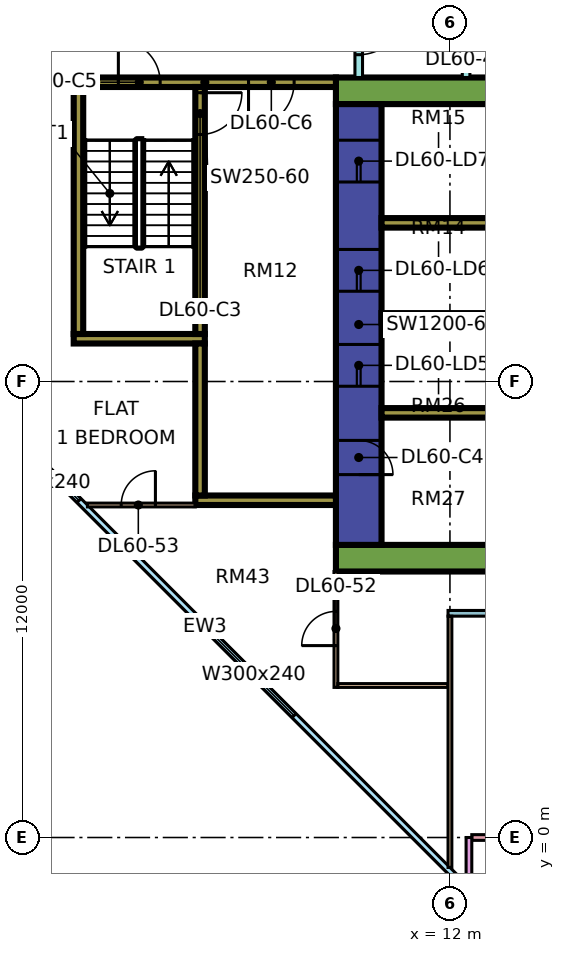
"""IFC4 building model, lengths in metres.
Left out: names, types, materials, properties, quantities, classifications, styles, units other than length and angle.
Written with IfcOpenShell. Run it as: python <this file> out.ifc"""

import sys

from ifc_helpers import new_model, si_unit, direction, frame, frame_2d, origin, place, context, subcontext, project, spatial, rectangle, extrude, element, fill, save


model = new_model("IFC4")
c1 = context("Model", 3, precision=1e-05, world=origin(), true_north=direction((0.0, 1.0)))
c2 = subcontext(c1, "Body", "Model", "MODEL_VIEW")
j1 = project(units=[si_unit("LENGTHUNIT", "METRE"), si_unit("PLANEANGLEUNIT", "RADIAN")], contexts=[c1])
p1 = place(None, origin())
s1 = spatial("IfcSite", under=j1, at=p1, CompositionType="ELEMENT")
p2 = place(p1, origin())
s2 = spatial("IfcBuilding", under=s1, at=p2, CompositionType="ELEMENT")
p3 = place(p2, frame((0.0, 0.0, 252.9)))
s3 = spatial("IfcBuildingStorey", under=s2, at=p3, CompositionType="ELEMENT", Elevation=252.9)
p4 = place(p3, frame((9.0, 7.35, 0.0), z_axis=(0.0, 0.0, 1.0), x_axis=(1.0, 0.0, 0.0)))
e1 = element("IfcWall", 1, at=p4, inside=s3, PredefinedType="SHEAR", context=c2, shape_type="SweptSolid", body=[
    extrude(rectangle(XDim=25.0, YDim=0.7, at=frame_2d((12.5, 0.0))), origin(), (0.0, 0.0, 1.0), 3.75),
])
p5 = place(p3, frame((9.0, 19.65, 0.0), z_axis=(0.0, 0.0, 1.0), x_axis=(1.0, 0.0, 0.0)))
e2 = element("IfcWall", 2, at=p5, inside=s3, PredefinedType="SHEAR", context=c2, shape_type="SweptSolid", body=[
    extrude(rectangle(XDim=25.0, YDim=0.7, at=frame_2d((12.5, 0.0))), origin(), (0.0, 0.0, 1.0), 3.75),
])
p6 = place(p5, frame((19.1, 0.0, 0.0)))
e3 = element("IfcOpeningElement", 3, at=p6, cuts=e2, PredefinedType="OPENING", context=c2, shape_type="SweptSolid", body=[
    extrude(rectangle(XDim=1.8, YDim=2.4, at=frame_2d((0.9, 1.2))), frame((0.0, 0.36, 0.0), z_axis=(0.0, -1.0, 0.0), x_axis=(1.0, 0.0, 0.0)), (0.0, 0.0, 1.0), 0.72),
])
p7 = place(p3, frame((9.6, 7.7, 0.0), z_axis=(0.0, 0.0, 1.0), x_axis=(0.0, 1.0, 0.0)))
e4 = element("IfcWall", 4, at=p7, inside=s3, PredefinedType="SHEAR", context=c2, shape_type="SweptSolid", body=[
    extrude(rectangle(XDim=11.6, YDim=1.2, at=frame_2d((5.8, 0.0))), origin(), (0.0, 0.0, 1.0), 3.75),
])
p8 = place(p7, frame((4.175, 0.0, 0.0)))
e5 = element("IfcOpeningElement", 5, at=p8, cuts=e4, PredefinedType="OPENING", context=c2, shape_type="SweptSolid", body=[
    extrude(rectangle(XDim=1.1, YDim=2.2, at=frame_2d((0.55, 1.1))), frame((0.0, 0.61, 0.0), z_axis=(0.0, -1.0, 0.0), x_axis=(1.0, 0.0, 0.0)), (0.0, 0.0, 1.0), 1.22),
])
p9 = place(p7, frame((6.675, 0.0, 0.0)))
e6 = element("IfcOpeningElement", 6, at=p9, cuts=e4, PredefinedType="OPENING", context=c2, shape_type="SweptSolid", body=[
    extrude(rectangle(XDim=1.1, YDim=2.2, at=frame_2d((0.55, 1.1))), frame((0.0, 0.61, 0.0), z_axis=(0.0, -1.0, 0.0), x_axis=(1.0, 0.0, 0.0)), (0.0, 0.0, 1.0), 1.22),
])
p10 = place(p7, frame((9.55, 0.0, 0.0)))
e7 = element("IfcOpeningElement", 7, at=p10, cuts=e4, PredefinedType="OPENING", context=c2, shape_type="SweptSolid", body=[
    extrude(rectangle(XDim=1.1, YDim=2.2, at=frame_2d((0.55, 1.1))), frame((0.0, 0.61, 0.0), z_axis=(0.0, -1.0, 0.0), x_axis=(1.0, 0.0, 0.0)), (0.0, 0.0, 1.0), 1.22),
])
p11 = place(p7, frame((1.85, 0.0, 0.0)))
e8 = element("IfcOpeningElement", 8, at=p11, cuts=e4, PredefinedType="OPENING", context=c2, shape_type="SweptSolid", body=[
    extrude(rectangle(XDim=0.9, YDim=2.1, at=frame_2d((0.45, 1.05))), frame((0.0, 0.61, 0.0), z_axis=(0.0, -1.0, 0.0), x_axis=(1.0, 0.0, 0.0)), (0.0, 0.0, 1.0), 1.22),
])
for number, where, z_axis, x_axis in (
    (9, (10.2, 11.175, 0.0), (0.0, 0.0, 1.0), (1.0, 0.0, 0.0)),
    (10, (10.2, 13.675, 0.0), (0.0, 0.0, 1.0), (1.0, 0.0, 0.0)),
    (11, (10.2, 16.175, 0.0), (0.0, 0.0, 1.0), (1.0, 0.0, 0.0)),
):
    element("IfcWall", number, at=place(p3, frame(where, z_axis=z_axis, x_axis=x_axis)), inside=s3, PredefinedType="SHEAR", context=c2, shape_type="SweptSolid", body=[
        extrude(rectangle(XDim=3.0, YDim=0.25, at=frame_2d((1.5, 0.0))), origin(), (0.0, 0.0, 1.0), 3.75),
    ])
p12 = place(p3, frame((2.1, 19.875, 0.0), z_axis=(0.0, 0.0, 1.0), x_axis=(1.0, 0.0, 0.0)))
e12 = element("IfcWall", 12, at=p12, inside=s3, PredefinedType="SHEAR", context=c2, shape_type="SweptSolid", body=[
    extrude(rectangle(XDim=6.9, YDim=0.25, at=frame_2d((3.45, 0.0))), origin(), (0.0, 0.0, 1.0), 3.75),
])
p13 = place(p12, frame((1.175, 0.0, 0.0)))
e13 = element("IfcOpeningElement", 13, at=p13, cuts=e12, PredefinedType="OPENING", context=c2, shape_type="SweptSolid", body=[
    extrude(rectangle(XDim=1.1, YDim=2.2, at=frame_2d((0.55, 1.1))), frame((0.0, 0.135, 0.0), z_axis=(0.0, -1.0, 0.0), x_axis=(1.0, 0.0, 0.0)), (0.0, 0.0, 1.0), 0.27),
])
p14 = place(p12, frame((4.6, 0.0, 0.0)))
e14 = element("IfcOpeningElement", 14, at=p14, cuts=e12, PredefinedType="OPENING", context=c2, shape_type="SweptSolid", body=[
    extrude(rectangle(XDim=1.2, YDim=2.2, at=frame_2d((0.6, 1.1))), frame((0.0, 0.135, 0.0), z_axis=(0.0, -1.0, 0.0), x_axis=(1.0, 0.0, 0.0)), (0.0, 0.0, 1.0), 0.27),
])
p15 = place(p3, frame((2.1, 13.125, 0.0), z_axis=(0.0, 0.0, 1.0), x_axis=(1.0, 0.0, 0.0)))
e15 = element("IfcWall", 15, at=p15, inside=s3, PredefinedType="SHEAR", context=c2, shape_type="SweptSolid", body=[
    extrude(rectangle(XDim=3.45, YDim=0.25, at=frame_2d((1.725, 0.0))), origin(), (0.0, 0.0, 1.0), 3.75),
])
p16 = place(p3, frame((2.225, 13.25, 0.0), z_axis=(0.0, 0.0, 1.0), x_axis=(0.0, 1.0, 0.0)))
e16 = element("IfcWall", 16, at=p16, inside=s3, PredefinedType="SHEAR", context=c2, shape_type="SweptSolid", body=[
    extrude(rectangle(XDim=6.5, YDim=0.25, at=frame_2d((3.25, 0.0))), origin(), (0.0, 0.0, 1.0), 3.75),
])
p17 = place(p3, frame((5.425, 13.25, 0.0), z_axis=(0.0, 0.0, 1.0), x_axis=(0.0, 1.0, 0.0)))
e17 = element("IfcWall", 17, at=p17, inside=s3, PredefinedType="SHEAR", context=c2, shape_type="SweptSolid", body=[
    extrude(rectangle(XDim=6.5, YDim=0.25, at=frame_2d((3.25, 0.0))), origin(), (0.0, 0.0, 1.0), 3.75),
])
p18 = place(p17, frame((5.25, 0.0, 0.0)))
e18 = element("IfcOpeningElement", 18, at=p18, cuts=e17, PredefinedType="OPENING", context=c2, shape_type="SweptSolid", body=[
    extrude(rectangle(XDim=1.1, YDim=2.2, at=frame_2d((0.55, 1.1))), frame((0.0, 0.135, 0.0), z_axis=(0.0, -1.0, 0.0), x_axis=(1.0, 0.0, 0.0)), (0.0, 0.0, 1.0), 0.27),
])
p19 = place(p3, frame((5.3, 8.875, 0.0), z_axis=(0.0, 0.0, 1.0), x_axis=(1.0, 0.0, 0.0)))
e19 = element("IfcWall", 19, at=p19, inside=s3, PredefinedType="SHEAR", context=c2, shape_type="SweptSolid", body=[
    extrude(rectangle(XDim=3.7, YDim=0.25, at=frame_2d((1.85, 0.0))), origin(), (0.0, 0.0, 1.0), 3.75),
])
p20 = place(p3, frame((5.425, 9.0, 0.0), z_axis=(0.0, 0.0, 1.0), x_axis=(0.0, 1.0, 0.0)))
e20 = element("IfcWall", 20, at=p20, inside=s3, PredefinedType="SHEAR", context=c2, shape_type="SweptSolid", body=[
    extrude(rectangle(XDim=4.0, YDim=0.25, at=frame_2d((2.0, 0.0))), origin(), (0.0, 0.0, 1.0), 3.75),
])
p21 = place(p3, frame((-1.447, 12.553, 0.0), z_axis=(0.0, 0.0, 1.0), x_axis=(0.707106781187, -0.707106781187, 0.0)))
e21 = element("IfcWall", 21, at=p21, inside=s3, PredefinedType="SOLIDWALL", context=c2, shape_type="SweptSolid", body=[
    extrude(rectangle(XDim=19.799, YDim=0.15, at=frame_2d((9.899, 0.0))), origin(), (0.0, 0.0, 1.0), 3.3),
])
p22 = place(p21, frame((2.212, 0.0, 0.45)))
e22 = element("IfcOpeningElement", 22, at=p22, cuts=e21, PredefinedType="OPENING", context=c2, shape_type="SweptSolid", body=[
    extrude(rectangle(XDim=3.0, YDim=2.4, at=frame_2d((1.5, 1.2))), frame((0.0, 0.085, 0.0), z_axis=(0.0, -1.0, 0.0), x_axis=(1.0, 0.0, 0.0)), (0.0, 0.0, 1.0), 0.17),
])
p23 = place(p21, frame((10.216, 0.0, 0.45)))
e23 = element("IfcOpeningElement", 23, at=p23, cuts=e21, PredefinedType="OPENING", context=c2, shape_type="SweptSolid", body=[
    extrude(rectangle(XDim=3.0, YDim=2.4, at=frame_2d((1.5, 1.2))), frame((0.0, 0.085, 0.0), z_axis=(0.0, -1.0, 0.0), x_axis=(1.0, 0.0, 0.0)), (0.0, 0.0, 1.0), 0.17),
])
p24 = place(p3, frame((12.575, 0.0, 0.0), z_axis=(0.0, 0.0, 1.0), x_axis=(1.0, 0.0, 0.0)))
e24 = element("IfcWall", 24, at=p24, inside=s3, PredefinedType="SOLIDWALL", context=c2, shape_type="SweptSolid", body=[
    extrude(rectangle(XDim=11.35, YDim=0.15, at=frame_2d((5.675, 0.0))), origin(), (0.0, 0.0, 1.0), 3.3),
])
p25 = place(p24, frame((3.312, 0.0, 0.0)))
e25 = element("IfcOpeningElement", 25, at=p25, cuts=e24, PredefinedType="OPENING", context=c2, shape_type="SweptSolid", body=[
    extrude(rectangle(XDim=1.8, YDim=2.4, at=frame_2d((0.9, 1.2))), frame((0.0, 0.085, 0.0), z_axis=(0.0, -1.0, 0.0), x_axis=(1.0, 0.0, 0.0)), (0.0, 0.0, 1.0), 0.17),
])
p26 = place(p24, frame((9.062, 0.0, 0.45)))
e26 = element("IfcOpeningElement", 26, at=p26, cuts=e24, PredefinedType="OPENING", context=c2, shape_type="SweptSolid", body=[
    extrude(rectangle(XDim=1.2, YDim=2.4, at=frame_2d((0.6, 1.2))), frame((0.0, 0.085, 0.0), z_axis=(0.0, -1.0, 0.0), x_axis=(1.0, 0.0, 0.0)), (0.0, 0.0, 1.0), 0.17),
])
p27 = place(p3, frame((12.5, -1.5, 0.0), z_axis=(0.0, 0.0, 1.0), x_axis=(0.0, 1.0, 0.0)))
e27 = element("IfcWall", 27, at=p27, inside=s3, PredefinedType="SOLIDWALL", context=c2, shape_type="SweptSolid", body=[
    extrude(rectangle(XDim=1.5, YDim=0.15, at=frame_2d((0.75, 0.0))), origin(), (0.0, 0.0, 1.0), 3.3),
])
p28 = place(p3, frame((0.074, 20.0, 0.0), z_axis=(0.0, 0.0, 1.0), x_axis=(1.0, 0.0, 0.0)))
e28 = element("IfcWall", 28, at=p28, inside=s3, PredefinedType="PARTITIONING", context=c2, shape_type="SweptSolid", body=[
    extrude(rectangle(XDim=2.026, YDim=0.2, at=frame_2d((1.013, 0.0))), origin(), (0.0, 0.0, 1.0), 3.3),
])
p29 = place(p3, frame((2.461, 8.75, 0.0), z_axis=(0.0, 0.0, 1.0), x_axis=(1.0, 0.0, 0.0)))
e29 = element("IfcWall", 29, at=p29, inside=s3, PredefinedType="PARTITIONING", context=c2, shape_type="SweptSolid", body=[
    extrude(rectangle(XDim=2.839, YDim=0.1, at=frame_2d((1.419, 0.0))), origin(), (0.0, 0.0, 1.0), 3.3),
])
p30 = place(p29, frame((0.889, 0.0, 0.0)))
e30 = element("IfcOpeningElement", 30, at=p30, cuts=e29, PredefinedType="OPENING", context=c2, shape_type="SweptSolid", body=[
    extrude(rectangle(XDim=0.9, YDim=2.1, at=frame_2d((0.45, 1.05))), frame((0.0, 0.06, 0.0), z_axis=(0.0, -1.0, 0.0), x_axis=(1.0, 0.0, 0.0)), (0.0, 0.0, 1.0), 0.12),
])
p31 = place(p3, frame((9.0, 3.95, 0.0), z_axis=(0.0, 0.0, 1.0), x_axis=(0.0, 1.0, 0.0)))
e31 = element("IfcWall", 31, at=p31, inside=s3, PredefinedType="PARTITIONING", context=c2, shape_type="SweptSolid", body=[
    extrude(rectangle(XDim=3.05, YDim=0.1, at=frame_2d((1.525, 0.0))), origin(), (0.0, 0.0, 1.0), 3.3),
])
p32 = place(p31, frame((1.1, 0.0, 0.0)))
e32 = element("IfcOpeningElement", 32, at=p32, cuts=e31, PredefinedType="OPENING", context=c2, shape_type="SweptSolid", body=[
    extrude(rectangle(XDim=0.9, YDim=2.1, at=frame_2d((0.45, 1.05))), frame((0.0, 0.06, 0.0), z_axis=(0.0, -1.0, 0.0), x_axis=(1.0, 0.0, 0.0)), (0.0, 0.0, 1.0), 0.12),
])
p33 = place(p3, frame((9.05, 4.0, 0.0), z_axis=(0.0, 0.0, 1.0), x_axis=(1.0, 0.0, 0.0)))
e33 = element("IfcWall", 33, at=p33, inside=s3, PredefinedType="PARTITIONING", context=c2, shape_type="SweptSolid", body=[
    extrude(rectangle(XDim=2.9, YDim=0.1, at=frame_2d((1.45, 0.0))), origin(), (0.0, 0.0, 1.0), 3.3),
])
p34 = place(p3, frame((9.6, 20.0, 0.0), z_axis=(0.0, 0.0, 1.0), x_axis=(0.0, 1.0, 0.0)))
e34 = element("IfcWall", 34, at=p34, inside=s3, PredefinedType="PARTITIONING", context=c2, shape_type="SweptSolid", body=[
    extrude(rectangle(XDim=44.35, YDim=0.2, at=frame_2d((22.175, 0.0))), origin(), (0.0, 0.0, 1.0), 3.3),
])
p35 = place(p34, frame((28.8, 0.0, 0.0)))
e35 = element("IfcOpeningElement", 35, at=p35, cuts=e34, PredefinedType="OPENING", context=c2, shape_type="SweptSolid", body=[
    extrude(rectangle(XDim=1.0, YDim=2.1, at=frame_2d((0.5, 1.05))), frame((0.0, 0.11, 0.0), z_axis=(0.0, -1.0, 0.0), x_axis=(1.0, 0.0, 0.0)), (0.0, 0.0, 1.0), 0.22),
])
p36 = place(p34, frame((0.6, 0.0, 0.0)))
e36 = element("IfcOpeningElement", 36, at=p36, cuts=e34, PredefinedType="OPENING", context=c2, shape_type="SweptSolid", body=[
    extrude(rectangle(XDim=1.2, YDim=2.1, at=frame_2d((0.6, 1.05))), frame((0.0, 0.11, 0.0), z_axis=(0.0, -1.0, 0.0), x_axis=(1.0, 0.0, 0.0)), (0.0, 0.0, 1.0), 0.22),
])
p37 = place(p34, frame((3.9, 0.0, 0.0)))
e37 = element("IfcOpeningElement", 37, at=p37, cuts=e34, PredefinedType="OPENING", context=c2, shape_type="SweptSolid", body=[
    extrude(rectangle(XDim=1.0, YDim=2.1, at=frame_2d((0.5, 1.05))), frame((0.0, 0.11, 0.0), z_axis=(0.0, -1.0, 0.0), x_axis=(1.0, 0.0, 0.0)), (0.0, 0.0, 1.0), 0.22),
])
p38 = place(p3, frame((11.95, 5.9, 0.0), z_axis=(0.0, 0.0, 1.0), x_axis=(1.0, 0.0, 0.0)))
e38 = element("IfcWall", 38, at=p38, inside=s3, PredefinedType="PARTITIONING", context=c2, shape_type="SweptSolid", body=[
    extrude(rectangle(XDim=21.1, YDim=0.15, at=frame_2d((10.55, 0.0))), origin(), (0.0, 0.0, 1.0), 3.3),
])
p39 = place(p38, frame((10.1, 0.0, 0.0)))
e39 = element("IfcOpeningElement", 39, at=p39, cuts=e38, PredefinedType="OPENING", context=c2, shape_type="SweptSolid", body=[
    extrude(rectangle(XDim=0.9, YDim=2.1, at=frame_2d((0.45, 1.05))), frame((0.0, 0.085, 0.0), z_axis=(0.0, -1.0, 0.0), x_axis=(1.0, 0.0, 0.0)), (0.0, 0.0, 1.0), 0.17),
])
p40 = place(p38, frame((16.1, 0.0, 0.0)))
e40 = element("IfcOpeningElement", 40, at=p40, cuts=e38, PredefinedType="OPENING", context=c2, shape_type="SweptSolid", body=[
    extrude(rectangle(XDim=0.9, YDim=2.1, at=frame_2d((0.45, 1.05))), frame((0.0, 0.085, 0.0), z_axis=(0.0, -1.0, 0.0), x_axis=(1.0, 0.0, 0.0)), (0.0, 0.0, 1.0), 0.17),
])
p41 = place(p38, frame((4.1, 0.0, 0.0)))
e41 = element("IfcOpeningElement", 41, at=p41, cuts=e38, PredefinedType="OPENING", context=c2, shape_type="SweptSolid", body=[
    extrude(rectangle(XDim=0.9, YDim=2.1, at=frame_2d((0.45, 1.05))), frame((0.0, 0.085, 0.0), z_axis=(0.0, -1.0, 0.0), x_axis=(1.0, 0.0, 0.0)), (0.0, 0.0, 1.0), 0.17),
])
p42 = place(p3, frame((12.0, -0.788, 0.0), z_axis=(0.0, 0.0, 1.0), x_axis=(0.0, 1.0, 0.0)))
e42 = element("IfcWall", 42, at=p42, inside=s3, PredefinedType="PARTITIONING", context=c2, shape_type="SweptSolid", body=[
    extrude(rectangle(XDim=6.613, YDim=0.1, at=frame_2d((3.306, 0.0))), origin(), (0.0, 0.0, 1.0), 3.3),
])
p43 = place(p3, frame((12.425, 20.0, 0.0), z_axis=(0.0, 0.0, 1.0), x_axis=(0.0, 1.0, 0.0)))
e43 = element("IfcWall", 43, at=p43, inside=s3, PredefinedType="PARTITIONING", context=c2, shape_type="SweptSolid", body=[
    extrude(rectangle(XDim=42.926, YDim=0.2, at=frame_2d((21.463, 0.0))), origin(), (0.0, 0.0, 1.0), 3.3),
])
p44 = place(p43, frame((7.0, 0.0, 0.0)))
e44 = element("IfcOpeningElement", 44, at=p44, cuts=e43, PredefinedType="OPENING", context=c2, shape_type="SweptSolid", body=[
    extrude(rectangle(XDim=1.0, YDim=2.1, at=frame_2d((0.5, 1.05))), frame((0.0, 0.11, 0.0), z_axis=(0.0, -1.0, 0.0), x_axis=(1.0, 0.0, 0.0)), (0.0, 0.0, 1.0), 0.22),
])
p45 = place(p43, frame((12.95, 0.0, 0.0)))
e45 = element("IfcOpeningElement", 45, at=p45, cuts=e43, PredefinedType="OPENING", context=c2, shape_type="SweptSolid", body=[
    extrude(rectangle(XDim=1.0, YDim=2.1, at=frame_2d((0.5, 1.05))), frame((0.0, 0.11, 0.0), z_axis=(0.0, -1.0, 0.0), x_axis=(1.0, 0.0, 0.0)), (0.0, 0.0, 1.0), 0.22),
])
p46 = place(p43, frame((16.75, 0.0, 0.0)))
e46 = element("IfcOpeningElement", 46, at=p46, cuts=e43, PredefinedType="OPENING", context=c2, shape_type="SweptSolid", body=[
    extrude(rectangle(XDim=1.0, YDim=2.1, at=frame_2d((0.5, 1.05))), frame((0.0, 0.11, 0.0), z_axis=(0.0, -1.0, 0.0), x_axis=(1.0, 0.0, 0.0)), (0.0, 0.0, 1.0), 0.22),
])
p47 = place(p43, frame((34.9, 0.0, 0.0)))
e47 = element("IfcOpeningElement", 47, at=p47, cuts=e43, PredefinedType="OPENING", context=c2, shape_type="SweptSolid", body=[
    extrude(rectangle(XDim=1.0, YDim=2.1, at=frame_2d((0.5, 1.05))), frame((0.0, 0.11, 0.0), z_axis=(0.0, -1.0, 0.0), x_axis=(1.0, 0.0, 0.0)), (0.0, 0.0, 1.0), 0.22),
])
p48 = place(p43, frame((1.15, 0.0, 0.0)))
e48 = element("IfcOpeningElement", 48, at=p48, cuts=e43, PredefinedType="OPENING", context=c2, shape_type="SweptSolid", body=[
    extrude(rectangle(XDim=1.8, YDim=2.1, at=frame_2d((0.9, 1.05))), frame((0.0, 0.11, 0.0), z_axis=(0.0, -1.0, 0.0), x_axis=(1.0, 0.0, 0.0)), (0.0, 0.0, 1.0), 0.22),
])
p49 = place(p43, frame((28.6, 0.0, 0.0)))
e49 = element("IfcOpeningElement", 49, at=p49, cuts=e43, PredefinedType="OPENING", context=c2, shape_type="SweptSolid", body=[
    extrude(rectangle(XDim=1.8, YDim=2.1, at=frame_2d((0.9, 1.05))), frame((0.0, 0.11, 0.0), z_axis=(0.0, -1.0, 0.0), x_axis=(1.0, 0.0, 0.0)), (0.0, 0.0, 1.0), 0.22),
])
p50 = place(p22, origin())
e50 = element("IfcWindow", 50, at=p50, inside=s3, PartitioningType="SINGLE_PANEL", PredefinedType="WINDOW", context=c2, shape_type="SweptSolid", body=[
    extrude(rectangle(XDim=3.0, YDim=2.4, at=frame_2d((1.5, 1.2))), frame((0.0, 0.03, 0.0), z_axis=(0.0, -1.0, 0.0), x_axis=(1.0, 0.0, 0.0)), (0.0, 0.0, 1.0), 0.06),
])
fill(e22, e50)
p51 = place(p23, origin())
e51 = element("IfcWindow", 51, at=p51, inside=s3, PartitioningType="SINGLE_PANEL", PredefinedType="WINDOW", context=c2, shape_type="SweptSolid", body=[
    extrude(rectangle(XDim=3.0, YDim=2.4, at=frame_2d((1.5, 1.2))), frame((0.0, 0.03, 0.0), z_axis=(0.0, -1.0, 0.0), x_axis=(1.0, 0.0, 0.0)), (0.0, 0.0, 1.0), 0.06),
])
fill(e23, e51)
p52 = place(p8, origin())
e52 = element("IfcDoor", 52, at=p52, inside=s3, OperationType="DOUBLE_DOOR_SLIDING", PredefinedType="DOOR", context=c2, shape_type="SweptSolid", body=[
    extrude(rectangle(XDim=1.1, YDim=2.2, at=frame_2d((0.55, 1.1))), frame((0.0, 0.025, 0.0), z_axis=(0.0, -1.0, 0.0), x_axis=(1.0, 0.0, 0.0)), (0.0, 0.0, 1.0), 0.05),
])
fill(e5, e52)
p53 = place(p9, origin())
e53 = element("IfcDoor", 53, at=p53, inside=s3, OperationType="DOUBLE_DOOR_SLIDING", PredefinedType="DOOR", context=c2, shape_type="SweptSolid", body=[
    extrude(rectangle(XDim=1.1, YDim=2.2, at=frame_2d((0.55, 1.1))), frame((0.0, 0.025, 0.0), z_axis=(0.0, -1.0, 0.0), x_axis=(1.0, 0.0, 0.0)), (0.0, 0.0, 1.0), 0.05),
])
fill(e6, e53)
p54 = place(p10, origin())
e54 = element("IfcDoor", 54, at=p54, inside=s3, OperationType="DOUBLE_DOOR_SLIDING", PredefinedType="DOOR", context=c2, shape_type="SweptSolid", body=[
    extrude(rectangle(XDim=1.1, YDim=2.2, at=frame_2d((0.55, 1.1))), frame((0.0, 0.025, 0.0), z_axis=(0.0, -1.0, 0.0), x_axis=(1.0, 0.0, 0.0)), (0.0, 0.0, 1.0), 0.05),
])
fill(e7, e54)
p55 = place(p18, origin())
e55 = element("IfcDoor", 55, at=p55, inside=s3, OperationType="SINGLE_SWING_RIGHT", PredefinedType="DOOR", context=c2, shape_type="SweptSolid", body=[
    extrude(rectangle(XDim=1.1, YDim=2.2, at=frame_2d((0.55, 1.1))), frame((0.0, 0.025, 0.0), z_axis=(0.0, -1.0, 0.0), x_axis=(1.0, 0.0, 0.0)), (0.0, 0.0, 1.0), 0.05),
])
fill(e18, e55)
p56 = place(p11, frame((0.9, 0.0, 0.0), z_axis=(0.0, 0.0, 1.0), x_axis=(-1.0, 0.0, 0.0)))
e56 = element("IfcDoor", 56, at=p56, inside=s3, OperationType="SINGLE_SWING_LEFT", PredefinedType="DOOR", context=c2, shape_type="SweptSolid", body=[
    extrude(rectangle(XDim=0.9, YDim=2.1, at=frame_2d((0.45, 1.05))), frame((0.0, 0.025, 0.0), z_axis=(0.0, -1.0, 0.0), x_axis=(1.0, 0.0, 0.0)), (0.0, 0.0, 1.0), 0.05),
])
fill(e8, e56)
p57 = place(p13, origin())
e57 = element("IfcDoor", 57, at=p57, inside=s3, OperationType="SINGLE_SWING_LEFT", PredefinedType="DOOR", context=c2, shape_type="SweptSolid", body=[
    extrude(rectangle(XDim=1.1, YDim=2.2, at=frame_2d((0.55, 1.1))), frame((0.0, 0.025, 0.0), z_axis=(0.0, -1.0, 0.0), x_axis=(1.0, 0.0, 0.0)), (0.0, 0.0, 1.0), 0.05),
])
fill(e13, e57)
p58 = place(p14, frame((1.2, 0.0, 0.0), z_axis=(0.0, 0.0, 1.0), x_axis=(-1.0, 0.0, 0.0)))
e58 = element("IfcDoor", 58, at=p58, inside=s3, OperationType="SINGLE_SWING_LEFT", PredefinedType="DOOR", context=c2, shape_type="SweptSolid", body=[
    extrude(rectangle(XDim=1.2, YDim=2.2, at=frame_2d((0.6, 1.1))), frame((0.0, 0.025, 0.0), z_axis=(0.0, -1.0, 0.0), x_axis=(1.0, 0.0, 0.0)), (0.0, 0.0, 1.0), 0.05),
])
fill(e14, e58)
p59 = place(p36, origin())
e59 = element("IfcDoor", 59, at=p59, inside=s3, OperationType="SINGLE_SWING_RIGHT", PredefinedType="DOOR", context=c2, shape_type="SweptSolid", body=[
    extrude(rectangle(XDim=1.2, YDim=2.1, at=frame_2d((0.6, 1.05))), frame((0.0, 0.025, 0.0), z_axis=(0.0, -1.0, 0.0), x_axis=(1.0, 0.0, 0.0)), (0.0, 0.0, 1.0), 0.05),
])
fill(e36, e59)
p60 = place(p32, origin())
e60 = element("IfcDoor", 60, at=p60, inside=s3, OperationType="SINGLE_SWING_LEFT", PredefinedType="DOOR", context=c2, shape_type="SweptSolid", body=[
    extrude(rectangle(XDim=0.9, YDim=2.1, at=frame_2d((0.45, 1.05))), frame((0.0, 0.025, 0.0), z_axis=(0.0, -1.0, 0.0), x_axis=(1.0, 0.0, 0.0)), (0.0, 0.0, 1.0), 0.05),
])
fill(e32, e60)
p61 = place(p30, frame((0.9, 0.0, 0.0), z_axis=(0.0, 0.0, 1.0), x_axis=(-1.0, 0.0, 0.0)))
e61 = element("IfcDoor", 61, at=p61, inside=s3, OperationType="SINGLE_SWING_RIGHT", PredefinedType="DOOR", context=c2, shape_type="SweptSolid", body=[
    extrude(rectangle(XDim=0.9, YDim=2.1, at=frame_2d((0.45, 1.05))), frame((0.0, 0.025, 0.0), z_axis=(0.0, -1.0, 0.0), x_axis=(1.0, 0.0, 0.0)), (0.0, 0.0, 1.0), 0.05),
])
fill(e30, e61)
save(model, sys.argv[1])
